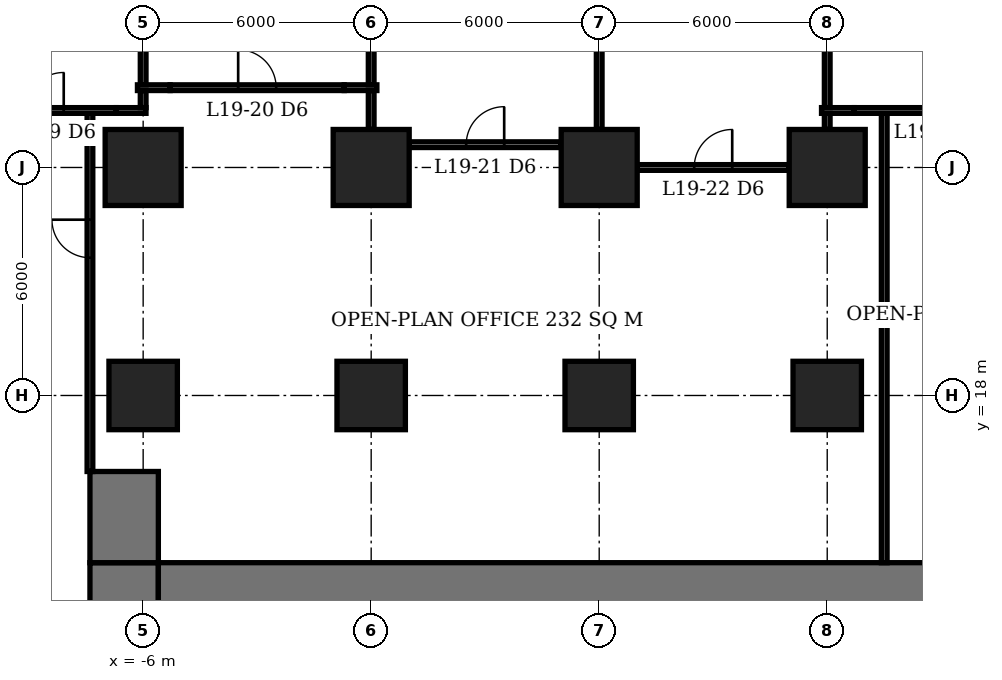
"""IFC4 building model, lengths in metres.
Left out: names, types, materials, properties, quantities, classifications, styles, units other than length and angle.
Written with IfcOpenShell. Run it as: python <this file> out.ifc"""

import sys

from ifc_helpers import new_model, si_unit, direction, frame, frame_2d, origin, origin_2d, place, context, subcontext, project, spatial, rectangle, extrude, element, fill, save


model = new_model("IFC4")
c1 = context("Model", 3, precision=1e-05, world=origin(), true_north=direction((0.0, 1.0)))
c2 = subcontext(c1, "Body", "Model", "MODEL_VIEW")
j1 = project(units=[si_unit("LENGTHUNIT", "METRE"), si_unit("PLANEANGLEUNIT", "RADIAN")], contexts=[c1])
p1 = place(None, origin())
s1 = spatial("IfcSite", under=j1, at=p1, CompositionType="ELEMENT")
p2 = place(p1, origin())
s2 = spatial("IfcBuilding", under=s1, at=p2, CompositionType="ELEMENT")
p3 = place(p2, frame((0.0, 0.0, 80.6)))
s3 = spatial("IfcBuildingStorey", under=s2, at=p3, CompositionType="ELEMENT", Elevation=80.6)
p4 = place(p3, frame((-6.0, 18.0, 0.0), z_axis=(0.0, 0.0, 1.0), x_axis=(1.0, 0.0, 0.0)))
e1 = element("IfcColumn", 1, at=p4, inside=s3, PredefinedType="COLUMN", context=c2, shape_type="SweptSolid", body=[
    extrude(rectangle(XDim=1.8, YDim=1.8, at=origin_2d()), origin(), (0.0, 0.0, 1.0), 3.9),
])
p5 = place(p3, frame((-6.0, 24.0, 0.0), z_axis=(0.0, 0.0, 1.0), x_axis=(1.0, 0.0, 0.0)))
e2 = element("IfcColumn", 2, at=p5, inside=s3, PredefinedType="COLUMN", context=c2, shape_type="SweptSolid", body=[
    extrude(rectangle(XDim=2.0, YDim=2.0, at=origin_2d()), origin(), (0.0, 0.0, 1.0), 3.9),
])
p6 = place(p3, frame((0.0, 18.0, 0.0), z_axis=(0.0, 0.0, 1.0), x_axis=(1.0, 0.0, 0.0)))
e3 = element("IfcColumn", 3, at=p6, inside=s3, PredefinedType="COLUMN", context=c2, shape_type="SweptSolid", body=[
    extrude(rectangle(XDim=1.8, YDim=1.8, at=origin_2d()), origin(), (0.0, 0.0, 1.0), 3.9),
])
p7 = place(p3, frame((0.0, 24.0, 0.0), z_axis=(0.0, 0.0, 1.0), x_axis=(1.0, 0.0, 0.0)))
e4 = element("IfcColumn", 4, at=p7, inside=s3, PredefinedType="COLUMN", context=c2, shape_type="SweptSolid", body=[
    extrude(rectangle(XDim=2.0, YDim=2.0, at=origin_2d()), origin(), (0.0, 0.0, 1.0), 3.9),
])
p8 = place(p3, frame((6.0, 18.0, 0.0), z_axis=(0.0, 0.0, 1.0), x_axis=(1.0, 0.0, 0.0)))
e5 = element("IfcColumn", 5, at=p8, inside=s3, PredefinedType="COLUMN", context=c2, shape_type="SweptSolid", body=[
    extrude(rectangle(XDim=1.8, YDim=1.8, at=origin_2d()), origin(), (0.0, 0.0, 1.0), 3.9),
])
p9 = place(p3, frame((6.0, 24.0, 0.0), z_axis=(0.0, 0.0, 1.0), x_axis=(1.0, 0.0, 0.0)))
e6 = element("IfcColumn", 6, at=p9, inside=s3, PredefinedType="COLUMN", context=c2, shape_type="SweptSolid", body=[
    extrude(rectangle(XDim=2.0, YDim=2.0, at=origin_2d()), origin(), (0.0, 0.0, 1.0), 3.9),
])
p10 = place(p3, frame((12.0, 18.0, 0.0), z_axis=(0.0, 0.0, 1.0), x_axis=(1.0, 0.0, 0.0)))
e7 = element("IfcColumn", 7, at=p10, inside=s3, PredefinedType="COLUMN", context=c2, shape_type="SweptSolid", body=[
    extrude(rectangle(XDim=1.8, YDim=1.8, at=origin_2d()), origin(), (0.0, 0.0, 1.0), 3.9),
])
p11 = place(p3, frame((12.0, 24.0, 0.0), z_axis=(0.0, 0.0, 1.0), x_axis=(1.0, 0.0, 0.0)))
e8 = element("IfcColumn", 8, at=p11, inside=s3, PredefinedType="COLUMN", context=c2, shape_type="SweptSolid", body=[
    extrude(rectangle(XDim=2.0, YDim=2.0, at=origin_2d()), origin(), (0.0, 0.0, 1.0), 3.9),
])
p12 = place(p3, frame((-5.6, 12.6, 0.0), z_axis=(0.0, 0.0, 1.0), x_axis=(1.0, 0.0, 0.0)))
e9 = element("IfcWall", 9, at=p12, inside=s3, PredefinedType="SHEAR", context=c2, shape_type="SweptSolid", body=[
    extrude(rectangle(XDim=23.2, YDim=2.0, at=frame_2d((11.6, 0.0))), origin(), (0.0, 0.0, 1.0), 3.9),
])
p13 = place(p3, frame((-6.5, -7.6, 0.0), z_axis=(0.0, 0.0, 1.0), x_axis=(0.0, 1.0, 0.0)))
e10 = element("IfcWall", 10, at=p13, inside=s3, PredefinedType="SHEAR", context=c2, shape_type="SweptSolid", body=[
    extrude(rectangle(XDim=21.2, YDim=1.8, at=frame_2d((10.6, 0.0))), origin(), (0.0, 0.0, 1.0), 3.9),
])
p14 = place(p13, frame((7.8, 0.0, 0.0)))
e11 = element("IfcOpeningElement", 11, at=p14, cuts=e10, PredefinedType="OPENING", context=c2, shape_type="SweptSolid", body=[
    extrude(rectangle(XDim=1.8, YDim=2.4, at=frame_2d((0.9, 1.2))), frame((0.0, 0.91, 0.0), z_axis=(0.0, -1.0, 0.0), x_axis=(1.0, 0.0, 0.0)), (0.0, 0.0, 1.0), 1.82),
])
p15 = place(p3, frame((-6.5, 13.6, 0.0), z_axis=(0.0, 0.0, 1.0), x_axis=(0.0, 1.0, 0.0)))
e12 = element("IfcWall", 12, at=p15, inside=s3, PredefinedType="SHEAR", context=c2, shape_type="SweptSolid", body=[
    extrude(rectangle(XDim=2.4, YDim=1.8, at=frame_2d((1.2, 0.0))), origin(), (0.0, 0.0, 1.0), 3.9),
])
p16 = place(p3, frame((7.0, 24.0, 0.0), z_axis=(0.0, 0.0, 1.0), x_axis=(1.0, 0.0, 0.0)))
e13 = element("IfcWall", 13, at=p16, inside=s3, PredefinedType="PARTITIONING", context=c2, shape_type="SweptSolid", body=[
    extrude(rectangle(XDim=4.0, YDim=0.15, at=frame_2d((2.0, 0.0))), origin(), (0.0, 0.0, 1.0), 3.65),
])
p17 = place(p16, frame((1.5, 0.0, 0.0)))
e14 = element("IfcOpeningElement", 14, at=p17, cuts=e13, PredefinedType="OPENING", context=c2, shape_type="SweptSolid", body=[
    extrude(rectangle(XDim=1.0, YDim=2.1, at=frame_2d((0.5, 1.05))), frame((0.0, 0.085, 0.0), z_axis=(0.0, -1.0, 0.0), x_axis=(1.0, 0.0, 0.0)), (0.0, 0.0, 1.0), 0.17),
])
p18 = place(p3, frame((1.0, 24.6, 0.0), z_axis=(0.0, 0.0, 1.0), x_axis=(1.0, 0.0, 0.0)))
e15 = element("IfcWall", 15, at=p18, inside=s3, PredefinedType="PARTITIONING", context=c2, shape_type="SweptSolid", body=[
    extrude(rectangle(XDim=4.0, YDim=0.15, at=frame_2d((2.0, 0.0))), origin(), (0.0, 0.0, 1.0), 3.65),
])
p19 = place(p18, frame((1.5, 0.0, 0.0)))
e16 = element("IfcOpeningElement", 16, at=p19, cuts=e15, PredefinedType="OPENING", context=c2, shape_type="SweptSolid", body=[
    extrude(rectangle(XDim=1.0, YDim=2.1, at=frame_2d((0.5, 1.05))), frame((0.0, 0.085, 0.0), z_axis=(0.0, -1.0, 0.0), x_axis=(1.0, 0.0, 0.0)), (0.0, 0.0, 1.0), 0.17),
])
p20 = place(p3, frame((-11.49, 25.5, 0.0), z_axis=(0.0, 0.0, 1.0), x_axis=(1.0, 0.0, 0.0)))
e17 = element("IfcWall", 17, at=p20, inside=s3, PredefinedType="PARTITIONING", context=c2, shape_type="SweptSolid", body=[
    extrude(rectangle(XDim=4.78, YDim=0.15, at=frame_2d((2.39, 0.0))), origin(), (0.0, 0.0, 1.0), 3.65),
])
p21 = place(p20, frame((2.4, 0.0, 0.0)))
e18 = element("IfcOpeningElement", 18, at=p21, cuts=e17, PredefinedType="OPENING", context=c2, shape_type="SweptSolid", body=[
    extrude(rectangle(XDim=1.0, YDim=2.1, at=frame_2d((0.5, 1.05))), frame((0.0, 0.085, 0.0), z_axis=(0.0, -1.0, 0.0), x_axis=(1.0, 0.0, 0.0)), (0.0, 0.0, 1.0), 0.17),
])
p22 = place(p3, frame((-6.71, 25.5, 0.0), z_axis=(0.0, 0.0, 1.0), x_axis=(1.0, 0.0, 0.0)))
e19 = element("IfcWall", 19, at=p22, inside=s3, PredefinedType="PARTITIONING", context=c2, shape_type="SweptSolid", body=[
    extrude(rectangle(XDim=0.785, YDim=0.15, at=frame_2d((0.393, 0.0))), origin(), (0.0, 0.0, 1.0), 2.65),
])
p23 = place(p3, frame((11.85, 25.5, 0.0), z_axis=(0.0, 0.0, 1.0), x_axis=(1.0, 0.0, 0.0)))
e20 = element("IfcWall", 20, at=p23, inside=s3, PredefinedType="PARTITIONING", context=c2, shape_type="SweptSolid", body=[
    extrude(rectangle(XDim=0.86, YDim=0.15, at=frame_2d((0.43, 0.0))), origin(), (0.0, 0.0, 1.0), 2.65),
])
p24 = place(p3, frame((12.71, 25.5, 0.0), z_axis=(0.0, 0.0, 1.0), x_axis=(1.0, 0.0, 0.0)))
e21 = element("IfcWall", 21, at=p24, inside=s3, PredefinedType="PARTITIONING", context=c2, shape_type="SweptSolid", body=[
    extrude(rectangle(XDim=4.78, YDim=0.15, at=frame_2d((2.39, 0.0))), origin(), (0.0, 0.0, 1.0), 3.65),
])
p25 = place(p24, frame((1.89, 0.0, 0.0)))
e22 = element("IfcOpeningElement", 22, at=p25, cuts=e21, PredefinedType="OPENING", context=c2, shape_type="SweptSolid", body=[
    extrude(rectangle(XDim=1.0, YDim=2.1, at=frame_2d((0.5, 1.05))), frame((0.0, 0.085, 0.0), z_axis=(0.0, -1.0, 0.0), x_axis=(1.0, 0.0, 0.0)), (0.0, 0.0, 1.0), 0.17),
])
p26 = place(p3, frame((-6.15, 26.1, 0.0), z_axis=(0.0, 0.0, 1.0), x_axis=(1.0, 0.0, 0.0)))
e23 = element("IfcWall", 23, at=p26, inside=s3, PredefinedType="PARTITIONING", context=c2, shape_type="SweptSolid", body=[
    extrude(rectangle(XDim=0.86, YDim=0.15, at=frame_2d((0.43, 0.0))), origin(), (0.0, 0.0, 1.0), 2.65),
])
p27 = place(p3, frame((-5.29, 26.1, 0.0), z_axis=(0.0, 0.0, 1.0), x_axis=(1.0, 0.0, 0.0)))
e24 = element("IfcWall", 24, at=p27, inside=s3, PredefinedType="PARTITIONING", context=c2, shape_type="SweptSolid", body=[
    extrude(rectangle(XDim=4.58, YDim=0.15, at=frame_2d((2.29, 0.0))), origin(), (0.0, 0.0, 1.0), 3.65),
])
p28 = place(p27, frame((1.79, 0.0, 0.0)))
e25 = element("IfcOpeningElement", 25, at=p28, cuts=e24, PredefinedType="OPENING", context=c2, shape_type="SweptSolid", body=[
    extrude(rectangle(XDim=1.0, YDim=2.1, at=frame_2d((0.5, 1.05))), frame((0.0, 0.085, 0.0), z_axis=(0.0, -1.0, 0.0), x_axis=(1.0, 0.0, 0.0)), (0.0, 0.0, 1.0), 0.17),
])
p29 = place(p3, frame((-0.71, 26.1, 0.0), z_axis=(0.0, 0.0, 1.0), x_axis=(1.0, 0.0, 0.0)))
e26 = element("IfcWall", 26, at=p29, inside=s3, PredefinedType="PARTITIONING", context=c2, shape_type="SweptSolid", body=[
    extrude(rectangle(XDim=0.86, YDim=0.15, at=frame_2d((0.43, 0.0))), origin(), (0.0, 0.0, 1.0), 2.65),
])
p30 = place(p3, frame((-6.0, 25.575, 0.0), z_axis=(0.0, 0.0, 1.0), x_axis=(0.0, 1.0, 0.0)))
e27 = element("IfcWall", 27, at=p30, inside=s3, PredefinedType="PARTITIONING", context=c2, shape_type="SweptSolid", body=[
    extrude(rectangle(XDim=0.45, YDim=0.15, at=frame_2d((0.225, 0.0))), origin(), (0.0, 0.0, 1.0), 2.65),
])
p31 = place(p3, frame((-6.0, 26.175, 0.0), z_axis=(0.0, 0.0, 1.0), x_axis=(0.0, 1.0, 0.0)))
e28 = element("IfcWall", 28, at=p31, inside=s3, PredefinedType="PARTITIONING", context=c2, shape_type="SweptSolid", body=[
    extrude(rectangle(XDim=2.135, YDim=0.15, at=frame_2d((1.067, 0.0))), origin(), (0.0, 0.0, 1.0), 2.65),
])
p32 = place(p3, frame((0.0, 25.0, 0.0), z_axis=(0.0, 0.0, 1.0), x_axis=(0.0, 1.0, 0.0)))
e29 = element("IfcWall", 29, at=p32, inside=s3, PredefinedType="PARTITIONING", context=c2, shape_type="SweptSolid", body=[
    extrude(rectangle(XDim=1.025, YDim=0.15, at=frame_2d((0.512, 0.0))), origin(), (0.0, 0.0, 1.0), 2.65),
])
p33 = place(p3, frame((0.0, 26.175, 0.0), z_axis=(0.0, 0.0, 1.0), x_axis=(0.0, 1.0, 0.0)))
e30 = element("IfcWall", 30, at=p33, inside=s3, PredefinedType="PARTITIONING", context=c2, shape_type="SweptSolid", body=[
    extrude(rectangle(XDim=2.135, YDim=0.15, at=frame_2d((1.067, 0.0))), origin(), (0.0, 0.0, 1.0), 2.65),
])
p34 = place(p3, frame((6.0, 25.0, 0.0), z_axis=(0.0, 0.0, 1.0), x_axis=(0.0, 1.0, 0.0)))
e31 = element("IfcWall", 31, at=p34, inside=s3, PredefinedType="PARTITIONING", context=c2, shape_type="SweptSolid", body=[
    extrude(rectangle(XDim=3.31, YDim=0.15, at=frame_2d((1.655, 0.0))), origin(), (0.0, 0.0, 1.0), 2.65),
])
p35 = place(p3, frame((12.0, 25.0, 0.0), z_axis=(0.0, 0.0, 1.0), x_axis=(0.0, 1.0, 0.0)))
e32 = element("IfcWall", 32, at=p35, inside=s3, PredefinedType="PARTITIONING", context=c2, shape_type="SweptSolid", body=[
    extrude(rectangle(XDim=0.425, YDim=0.15, at=frame_2d((0.212, 0.0))), origin(), (0.0, 0.0, 1.0), 2.65),
])
p36 = place(p3, frame((12.0, 25.575, 0.0), z_axis=(0.0, 0.0, 1.0), x_axis=(0.0, 1.0, 0.0)))
e33 = element("IfcWall", 33, at=p36, inside=s3, PredefinedType="PARTITIONING", context=c2, shape_type="SweptSolid", body=[
    extrude(rectangle(XDim=2.735, YDim=0.15, at=frame_2d((1.368, 0.0))), origin(), (0.0, 0.0, 1.0), 2.65),
])
p37 = place(p3, frame((-7.4, 16.0, 0.0), z_axis=(0.0, 0.0, 1.0), x_axis=(0.0, 1.0, 0.0)))
e34 = element("IfcWall", 34, at=p37, inside=s3, PredefinedType="PARTITIONING", context=c2, shape_type="SweptSolid", body=[
    extrude(rectangle(XDim=9.425, YDim=0.15, at=frame_2d((4.712, 0.0))), origin(), (0.0, 0.0, 1.0), 3.65),
])
p38 = place(p37, frame((5.626, 0.0, 0.0)))
e35 = element("IfcOpeningElement", 35, at=p38, cuts=e34, PredefinedType="OPENING", context=c2, shape_type="SweptSolid", body=[
    extrude(rectangle(XDim=1.0, YDim=2.1, at=frame_2d((0.5, 1.05))), frame((0.0, 0.085, 0.0), z_axis=(0.0, -1.0, 0.0), x_axis=(1.0, 0.0, 0.0)), (0.0, 0.0, 1.0), 0.17),
])
p39 = place(p3, frame((13.5, 13.6, 0.0), z_axis=(0.0, 0.0, 1.0), x_axis=(0.0, 1.0, 0.0)))
e36 = element("IfcWall", 36, at=p39, inside=s3, PredefinedType="PARTITIONING", context=c2, shape_type="SweptSolid", body=[
    extrude(rectangle(XDim=11.825, YDim=0.15, at=frame_2d((5.913, 0.0))), origin(), (0.0, 0.0, 1.0), 3.65),
])
p40 = place(p21, origin())
e37 = element("IfcDoor", 37, at=p40, inside=s3, OperationType="SINGLE_SWING_RIGHT", PredefinedType="DOOR", context=c2, shape_type="SweptSolid", body=[
    extrude(rectangle(XDim=1.0, YDim=2.1, at=frame_2d((0.5, 1.05))), frame((0.0, 0.025, 0.0), z_axis=(0.0, -1.0, 0.0), x_axis=(1.0, 0.0, 0.0)), (0.0, 0.0, 1.0), 0.05),
])
fill(e18, e37)
p41 = place(p28, origin())
e38 = element("IfcDoor", 38, at=p41, inside=s3, OperationType="SINGLE_SWING_LEFT", PredefinedType="DOOR", context=c2, shape_type="SweptSolid", body=[
    extrude(rectangle(XDim=1.0, YDim=2.1, at=frame_2d((0.5, 1.05))), frame((0.0, 0.025, 0.0), z_axis=(0.0, -1.0, 0.0), x_axis=(1.0, 0.0, 0.0)), (0.0, 0.0, 1.0), 0.05),
])
fill(e25, e38)
p42 = place(p19, origin())
e39 = element("IfcDoor", 39, at=p42, inside=s3, OperationType="SINGLE_SWING_RIGHT", PredefinedType="DOOR", context=c2, shape_type="SweptSolid", body=[
    extrude(rectangle(XDim=1.0, YDim=2.1, at=frame_2d((0.5, 1.05))), frame((0.0, 0.025, 0.0), z_axis=(0.0, -1.0, 0.0), x_axis=(1.0, 0.0, 0.0)), (0.0, 0.0, 1.0), 0.05),
])
fill(e16, e39)
p43 = place(p17, origin())
e40 = element("IfcDoor", 40, at=p43, inside=s3, OperationType="SINGLE_SWING_RIGHT", PredefinedType="DOOR", context=c2, shape_type="SweptSolid", body=[
    extrude(rectangle(XDim=1.0, YDim=2.1, at=frame_2d((0.5, 1.05))), frame((0.0, 0.025, 0.0), z_axis=(0.0, -1.0, 0.0), x_axis=(1.0, 0.0, 0.0)), (0.0, 0.0, 1.0), 0.05),
])
fill(e14, e40)
p44 = place(p38, origin())
e41 = element("IfcDoor", 41, at=p44, inside=s3, OperationType="SINGLE_SWING_RIGHT", PredefinedType="DOOR", context=c2, shape_type="SweptSolid", body=[
    extrude(rectangle(XDim=1.0, YDim=2.1, at=frame_2d((0.5, 1.05))), frame((0.0, 0.025, 0.0), z_axis=(0.0, -1.0, 0.0), x_axis=(1.0, 0.0, 0.0)), (0.0, 0.0, 1.0), 0.05),
])
fill(e35, e41)
save(model, sys.argv[1])
